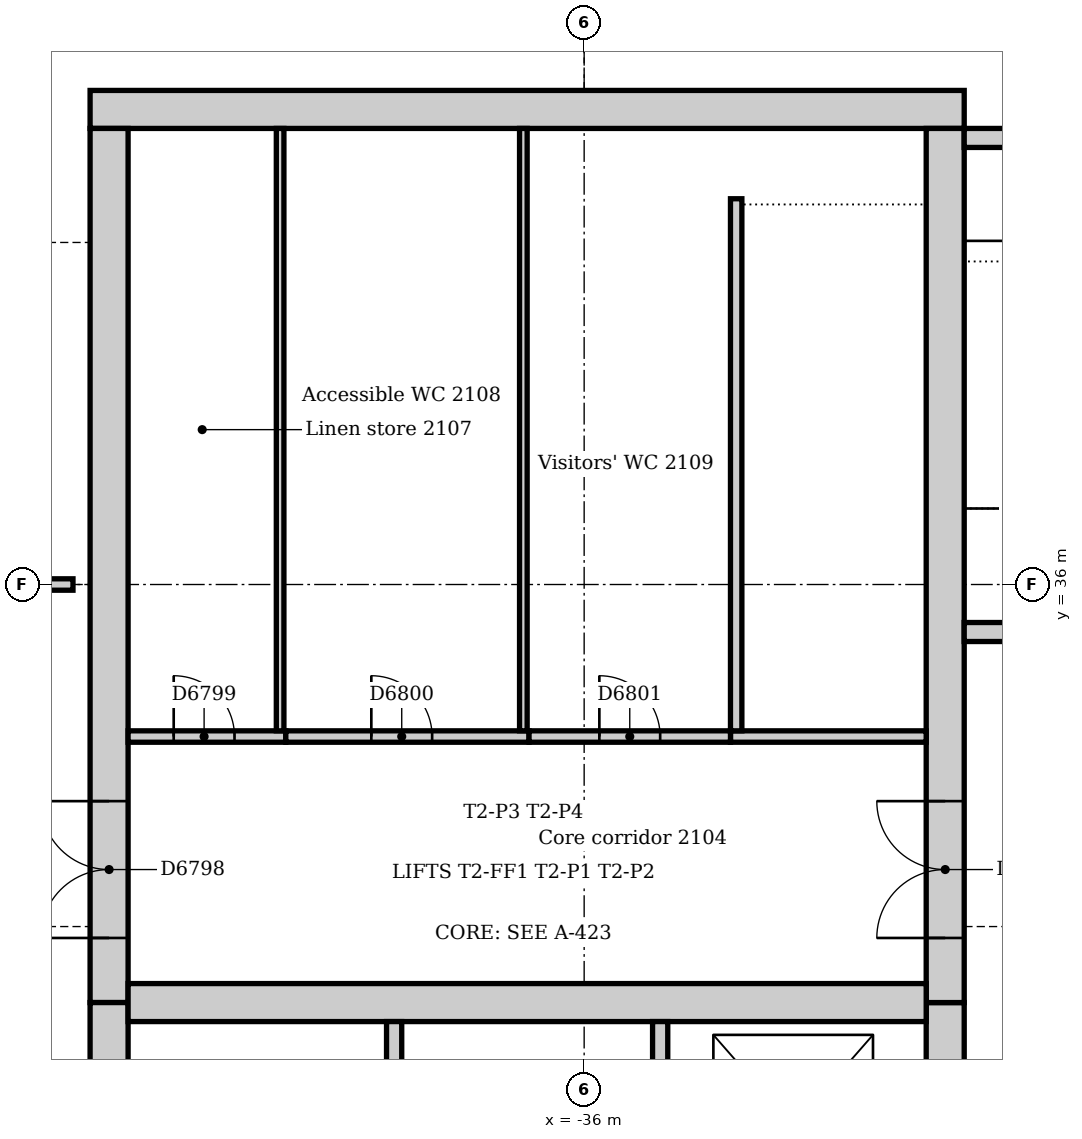
"""IFC4 building model, lengths in metres.
Left out: names, types, materials, properties, quantities, classifications, styles, units other than length and angle.
Written with IfcOpenShell. Run it as: python <this file> out.ifc"""

import sys

from ifc_helpers import new_model, si_unit, direction, frame, frame_2d, origin, place, context, subcontext, project, spatial, rectangle, extrude, element, fill, save


model = new_model("IFC4")
c1 = context("Model", 3, precision=1e-05, world=origin(), true_north=direction((0.0, 1.0)))
c2 = subcontext(c1, "Body", "Model", "MODEL_VIEW")
j1 = project(units=[si_unit("LENGTHUNIT", "METRE"), si_unit("PLANEANGLEUNIT", "RADIAN")], contexts=[c1])
p1 = place(None, origin())
s1 = spatial("IfcSite", under=j1, at=p1, CompositionType="ELEMENT")
p2 = place(p1, origin())
s2 = spatial("IfcBuilding", under=s1, at=p2, CompositionType="ELEMENT")
p3 = place(p2, frame((0.0, 0.0, 91.0)))
s3 = spatial("IfcBuildingStorey", under=s2, at=p3, CompositionType="ELEMENT", Elevation=91.0)
p4 = place(p3, frame((-31.0, 42.25, 0.0), z_axis=(0.0, 0.0, 1.0), x_axis=(-1.0, 0.0, 0.0)))
e1 = element("IfcWall", 1, at=p4, inside=s3, PredefinedType="SOLIDWALL", context=c2, shape_type="SweptSolid", body=[
    extrude(rectangle(XDim=11.5, YDim=0.5, at=frame_2d((5.75, 0.0))), origin(), (0.0, 0.0, 1.0), 4.0),
])
p5 = place(p3, frame((-31.25, 21.0, 0.0), z_axis=(0.0, 0.0, 1.0), x_axis=(0.0, 1.0, 0.0)))
e2 = element("IfcWall", 2, at=p5, inside=s3, PredefinedType="SOLIDWALL", context=c2, shape_type="SweptSolid", body=[
    extrude(rectangle(XDim=9.5, YDim=0.5, at=frame_2d((4.75, 0.0))), origin(), (0.0, 0.0, 1.0), 4.0),
])
p6 = place(p5, frame((5.25, 0.0, 0.0)))
e3 = element("IfcOpeningElement", 3, at=p6, cuts=e2, PredefinedType="OPENING", context=c2, shape_type="SweptSolid", body=[
    extrude(rectangle(XDim=1.0, YDim=2.1, at=frame_2d((0.5, 1.05))), frame((0.0, 0.26, 0.0), z_axis=(0.0, -1.0, 0.0), x_axis=(1.0, 0.0, 0.0)), (0.0, 0.0, 1.0), 0.52),
])
p7 = place(p3, frame((-31.25, 30.5, 0.0), z_axis=(0.0, 0.0, 1.0), x_axis=(0.0, 1.0, 0.0)))
e4 = element("IfcWall", 4, at=p7, inside=s3, PredefinedType="SOLIDWALL", context=c2, shape_type="SweptSolid", body=[
    extrude(rectangle(XDim=11.5, YDim=0.5, at=frame_2d((5.75, 0.0))), origin(), (0.0, 0.0, 1.0), 4.0),
])
p8 = place(p7, frame((0.85, 0.0, 0.0)))
e5 = element("IfcOpeningElement", 5, at=p8, cuts=e4, PredefinedType="OPENING", context=c2, shape_type="SweptSolid", body=[
    extrude(rectangle(XDim=1.8, YDim=2.1, at=frame_2d((0.9, 1.05))), frame((0.0, 0.26, 0.0), z_axis=(0.0, -1.0, 0.0), x_axis=(1.0, 0.0, 0.0)), (0.0, 0.0, 1.0), 0.52),
])
p9 = place(p3, frame((-42.25, 42.0, 0.0), z_axis=(0.0, 0.0, 1.0), x_axis=(0.0, -1.0, 0.0)))
e6 = element("IfcWall", 6, at=p9, inside=s3, PredefinedType="SOLIDWALL", context=c2, shape_type="SweptSolid", body=[
    extrude(rectangle(XDim=11.5, YDim=0.5, at=frame_2d((5.75, 0.0))), origin(), (0.0, 0.0, 1.0), 4.0),
])
p10 = place(p9, frame((8.85, 0.0, 0.0)))
e7 = element("IfcOpeningElement", 7, at=p10, cuts=e6, PredefinedType="OPENING", context=c2, shape_type="SweptSolid", body=[
    extrude(rectangle(XDim=1.8, YDim=2.1, at=frame_2d((0.9, 1.05))), frame((0.0, 0.26, 0.0), z_axis=(0.0, -1.0, 0.0), x_axis=(1.0, 0.0, 0.0)), (0.0, 0.0, 1.0), 0.52),
])
p11 = place(p3, frame((-42.25, 30.5, 0.0), z_axis=(0.0, 0.0, 1.0), x_axis=(0.0, -1.0, 0.0)))
e8 = element("IfcWall", 8, at=p11, inside=s3, PredefinedType="SOLIDWALL", context=c2, shape_type="SweptSolid", body=[
    extrude(rectangle(XDim=9.5, YDim=0.5, at=frame_2d((4.75, 0.0))), origin(), (0.0, 0.0, 1.0), 4.0),
])
p12 = place(p11, frame((3.85, 0.0, 0.0)))
e9 = element("IfcOpeningElement", 9, at=p12, cuts=e8, PredefinedType="OPENING", context=c2, shape_type="SweptSolid", body=[
    extrude(rectangle(XDim=1.8, YDim=2.1, at=frame_2d((0.9, 1.05))), frame((0.0, 0.26, 0.0), z_axis=(0.0, -1.0, 0.0), x_axis=(1.0, 0.0, 0.0)), (0.0, 0.0, 1.0), 0.52),
])
p13 = place(p3, frame((-42.0, 30.5, 0.0), z_axis=(0.0, 0.0, 1.0), x_axis=(1.0, 0.0, 0.0)))
e10 = element("IfcWall", 10, at=p13, inside=s3, PredefinedType="SOLIDWALL", context=c2, shape_type="SweptSolid", body=[
    extrude(rectangle(XDim=10.5, YDim=0.5, at=frame_2d((5.25, 0.0))), origin(), (0.0, 0.0, 1.0), 4.0),
])
p14 = place(p3, frame((-31.0, 35.375, 0.0), z_axis=(0.0, 0.0, 1.0), x_axis=(1.0, 0.0, 0.0)))
e11 = element("IfcWall", 11, at=p14, inside=s3, PredefinedType="SOLIDWALL", context=c2, shape_type="SweptSolid", body=[
    extrude(rectangle(XDim=3.64, YDim=0.25, at=frame_2d((1.82, 0.0))), origin(), (0.0, 0.0, 1.0), 4.0),
])
p15 = place(p14, frame((0.85, 0.0, 0.0)))
e12 = element("IfcOpeningElement", 12, at=p15, cuts=e11, PredefinedType="OPENING", context=c2, shape_type="SweptSolid", body=[
    extrude(rectangle(XDim=1.1, YDim=2.1, at=frame_2d((0.55, 1.05))), frame((0.0, 0.135, 0.0), z_axis=(0.0, -1.0, 0.0), x_axis=(1.0, 0.0, 0.0)), (0.0, 0.0, 1.0), 0.27),
])
p16 = place(p3, frame((-27.36, 41.875, 0.0), z_axis=(0.0, 0.0, 1.0), x_axis=(-1.0, 0.0, 0.0)))
e13 = element("IfcWall", 13, at=p16, inside=s3, PredefinedType="SOLIDWALL", context=c2, shape_type="SweptSolid", body=[
    extrude(rectangle(XDim=3.64, YDim=0.25, at=frame_2d((1.82, 0.0))), origin(), (0.0, 0.0, 1.0), 4.0),
])
for number, where, z_axis, x_axis in (
    (14, (-38.5, 27.4, 0.0), (0.0, 0.0, 1.0), (0.0, 1.0, 0.0)),
    (15, (-35.0, 27.4, 0.0), (0.0, 0.0, 1.0), (0.0, 1.0, 0.0)),
):
    element("IfcWall", number, at=place(p3, frame(where, z_axis=z_axis, x_axis=x_axis)), inside=s3, PredefinedType="SOLIDWALL", context=c2, shape_type="SweptSolid", body=[
        extrude(rectangle(XDim=2.85, YDim=0.2, at=frame_2d((1.425, 0.0))), origin(), (0.0, 0.0, 1.0), 4.0),
    ])
p17 = place(p3, frame((-34.075, 34.0, 0.0), z_axis=(0.0, 0.0, 1.0), x_axis=(1.0, 0.0, 0.0)))
e16 = element("IfcWall", 16, at=p17, inside=s3, PredefinedType="SOLIDWALL", context=c2, shape_type="SweptSolid", body=[
    extrude(rectangle(XDim=2.575, YDim=0.15, at=frame_2d((1.288, 0.0))), origin(), (0.0, 0.0, 1.0), 4.0),
])
p18 = place(p3, frame((-34.0, 41.075, 0.0), z_axis=(0.0, 0.0, 1.0), x_axis=(0.0, -1.0, 0.0)))
e17 = element("IfcWall", 17, at=p18, inside=s3, PredefinedType="SOLIDWALL", context=c2, shape_type="SweptSolid", body=[
    extrude(rectangle(XDim=7.0, YDim=0.15, at=frame_2d((3.5, 0.0))), origin(), (0.0, 0.0, 1.0), 4.0),
])
p19 = place(p3, frame((-39.925, 34.0, 0.0), z_axis=(0.0, 0.0, 1.0), x_axis=(-1.0, 0.0, 0.0)))
e18 = element("IfcWall", 18, at=p19, inside=s3, PredefinedType="PARTITIONING", context=c2, shape_type="SweptSolid", body=[
    extrude(rectangle(XDim=2.075, YDim=0.15, at=frame_2d((1.038, 0.0))), origin(), (0.0, 0.0, 1.0), 3.7),
])
p20 = place(p19, frame((0.675, 0.0, 0.0)))
e19 = element("IfcOpeningElement", 19, at=p20, cuts=e18, PredefinedType="OPENING", context=c2, shape_type="SweptSolid", body=[
    extrude(rectangle(XDim=0.8, YDim=2.1, at=frame_2d((0.4, 1.05))), frame((0.0, 0.085, 0.0), z_axis=(0.0, -1.0, 0.0), x_axis=(1.0, 0.0, 0.0)), (0.0, 0.0, 1.0), 0.17),
])
p21 = place(p3, frame((-36.725, 34.0, 0.0), z_axis=(0.0, 0.0, 1.0), x_axis=(-1.0, 0.0, 0.0)))
e20 = element("IfcWall", 20, at=p21, inside=s3, PredefinedType="PARTITIONING", context=c2, shape_type="SweptSolid", body=[
    extrude(rectangle(XDim=3.2, YDim=0.15, at=frame_2d((1.6, 0.0))), origin(), (0.0, 0.0, 1.0), 3.7),
])
p22 = place(p21, frame((1.275, 0.0, 0.0)))
e21 = element("IfcOpeningElement", 21, at=p22, cuts=e20, PredefinedType="OPENING", context=c2, shape_type="SweptSolid", body=[
    extrude(rectangle(XDim=0.8, YDim=2.1, at=frame_2d((0.4, 1.05))), frame((0.0, 0.085, 0.0), z_axis=(0.0, -1.0, 0.0), x_axis=(1.0, 0.0, 0.0)), (0.0, 0.0, 1.0), 0.17),
])
p23 = place(p3, frame((-34.075, 34.0, 0.0), z_axis=(0.0, 0.0, 1.0), x_axis=(-1.0, 0.0, 0.0)))
e22 = element("IfcWall", 22, at=p23, inside=s3, PredefinedType="PARTITIONING", context=c2, shape_type="SweptSolid", body=[
    extrude(rectangle(XDim=2.65, YDim=0.15, at=frame_2d((1.325, 0.0))), origin(), (0.0, 0.0, 1.0), 3.7),
])
p24 = place(p23, frame((0.925, 0.0, 0.0)))
e23 = element("IfcOpeningElement", 23, at=p24, cuts=e22, PredefinedType="OPENING", context=c2, shape_type="SweptSolid", body=[
    extrude(rectangle(XDim=0.8, YDim=2.1, at=frame_2d((0.4, 1.05))), frame((0.0, 0.085, 0.0), z_axis=(0.0, -1.0, 0.0), x_axis=(1.0, 0.0, 0.0)), (0.0, 0.0, 1.0), 0.17),
])
for number, where, z_axis, x_axis in (
    (24, (-40.0, 34.075, 0.0), (0.0, 0.0, 1.0), (0.0, 1.0, 0.0)),
    (25, (-36.8, 34.075, 0.0), (0.0, 0.0, 1.0), (0.0, 1.0, 0.0)),
):
    element("IfcWall", number, at=place(p3, frame(where, z_axis=z_axis, x_axis=x_axis)), inside=s3, PredefinedType="PARTITIONING", context=c2, shape_type="SweptSolid", body=[
        extrude(rectangle(XDim=7.925, YDim=0.1, at=frame_2d((3.962, 0.0))), origin(), (0.0, 0.0, 1.0), 3.7),
    ])
p25 = place(p3, frame((-44.65, 36.0, 0.0), z_axis=(0.0, 0.0, 1.0), x_axis=(1.0, 0.0, 0.0)))
e26 = element("IfcWall", 26, at=p25, inside=s3, PredefinedType="PARTITIONING", context=c2, shape_type="SweptSolid", body=[
    extrude(rectangle(XDim=1.925, YDim=0.15, at=frame_2d((0.963, 0.0))), origin(), (0.0, 0.0, 1.0), 3.452),
])
p26 = place(p25, frame((0.5, 0.0, 0.0)))
e27 = element("IfcOpeningElement", 27, at=p26, cuts=e26, PredefinedType="OPENING", context=c2, shape_type="SweptSolid", body=[
    extrude(rectangle(XDim=0.9, YDim=2.1, at=frame_2d((0.45, 1.05))), frame((0.0, 0.085, 0.0), z_axis=(0.0, -1.0, 0.0), x_axis=(1.0, 0.0, 0.0)), (0.0, 0.0, 1.0), 0.17),
])
p27 = place(p8, origin())
e28 = element("IfcDoor", 28, at=p27, inside=s3, OperationType="DOUBLE_DOOR_SINGLE_SWING", PredefinedType="DOOR", context=c2, shape_type="SweptSolid", body=[
    extrude(rectangle(XDim=1.8, YDim=2.1, at=frame_2d((0.9, 1.05))), frame((0.0, 0.025, 0.0), z_axis=(0.0, -1.0, 0.0), x_axis=(1.0, 0.0, 0.0)), (0.0, 0.0, 1.0), 0.05),
])
fill(e5, e28)
p28 = place(p10, frame((1.8, 0.0, 0.0), z_axis=(0.0, 0.0, 1.0), x_axis=(-1.0, 0.0, 0.0)))
e29 = element("IfcDoor", 29, at=p28, inside=s3, OperationType="DOUBLE_DOOR_SINGLE_SWING", PredefinedType="DOOR", context=c2, shape_type="SweptSolid", body=[
    extrude(rectangle(XDim=1.8, YDim=2.1, at=frame_2d((0.9, 1.05))), frame((0.0, 0.025, 0.0), z_axis=(0.0, -1.0, 0.0), x_axis=(1.0, 0.0, 0.0)), (0.0, 0.0, 1.0), 0.05),
])
fill(e7, e29)
p29 = place(p20, frame((0.8, 0.0, 0.0), z_axis=(0.0, 0.0, 1.0), x_axis=(-1.0, 0.0, 0.0)))
e30 = element("IfcDoor", 30, at=p29, inside=s3, OperationType="SINGLE_SWING_LEFT", PredefinedType="DOOR", context=c2, shape_type="SweptSolid", body=[
    extrude(rectangle(XDim=0.8, YDim=2.1, at=frame_2d((0.4, 1.05))), frame((0.0, 0.025, 0.0), z_axis=(0.0, -1.0, 0.0), x_axis=(1.0, 0.0, 0.0)), (0.0, 0.0, 1.0), 0.05),
])
fill(e19, e30)
p30 = place(p22, frame((0.8, 0.0, 0.0), z_axis=(0.0, 0.0, 1.0), x_axis=(-1.0, 0.0, 0.0)))
e31 = element("IfcDoor", 31, at=p30, inside=s3, OperationType="SINGLE_SWING_LEFT", PredefinedType="DOOR", context=c2, shape_type="SweptSolid", body=[
    extrude(rectangle(XDim=0.8, YDim=2.1, at=frame_2d((0.4, 1.05))), frame((0.0, 0.025, 0.0), z_axis=(0.0, -1.0, 0.0), x_axis=(1.0, 0.0, 0.0)), (0.0, 0.0, 1.0), 0.05),
])
fill(e21, e31)
p31 = place(p24, frame((0.8, 0.0, 0.0), z_axis=(0.0, 0.0, 1.0), x_axis=(-1.0, 0.0, 0.0)))
e32 = element("IfcDoor", 32, at=p31, inside=s3, OperationType="SINGLE_SWING_LEFT", PredefinedType="DOOR", context=c2, shape_type="SweptSolid", body=[
    extrude(rectangle(XDim=0.8, YDim=2.1, at=frame_2d((0.4, 1.05))), frame((0.0, 0.025, 0.0), z_axis=(0.0, -1.0, 0.0), x_axis=(1.0, 0.0, 0.0)), (0.0, 0.0, 1.0), 0.05),
])
fill(e23, e32)
save(model, sys.argv[1])
